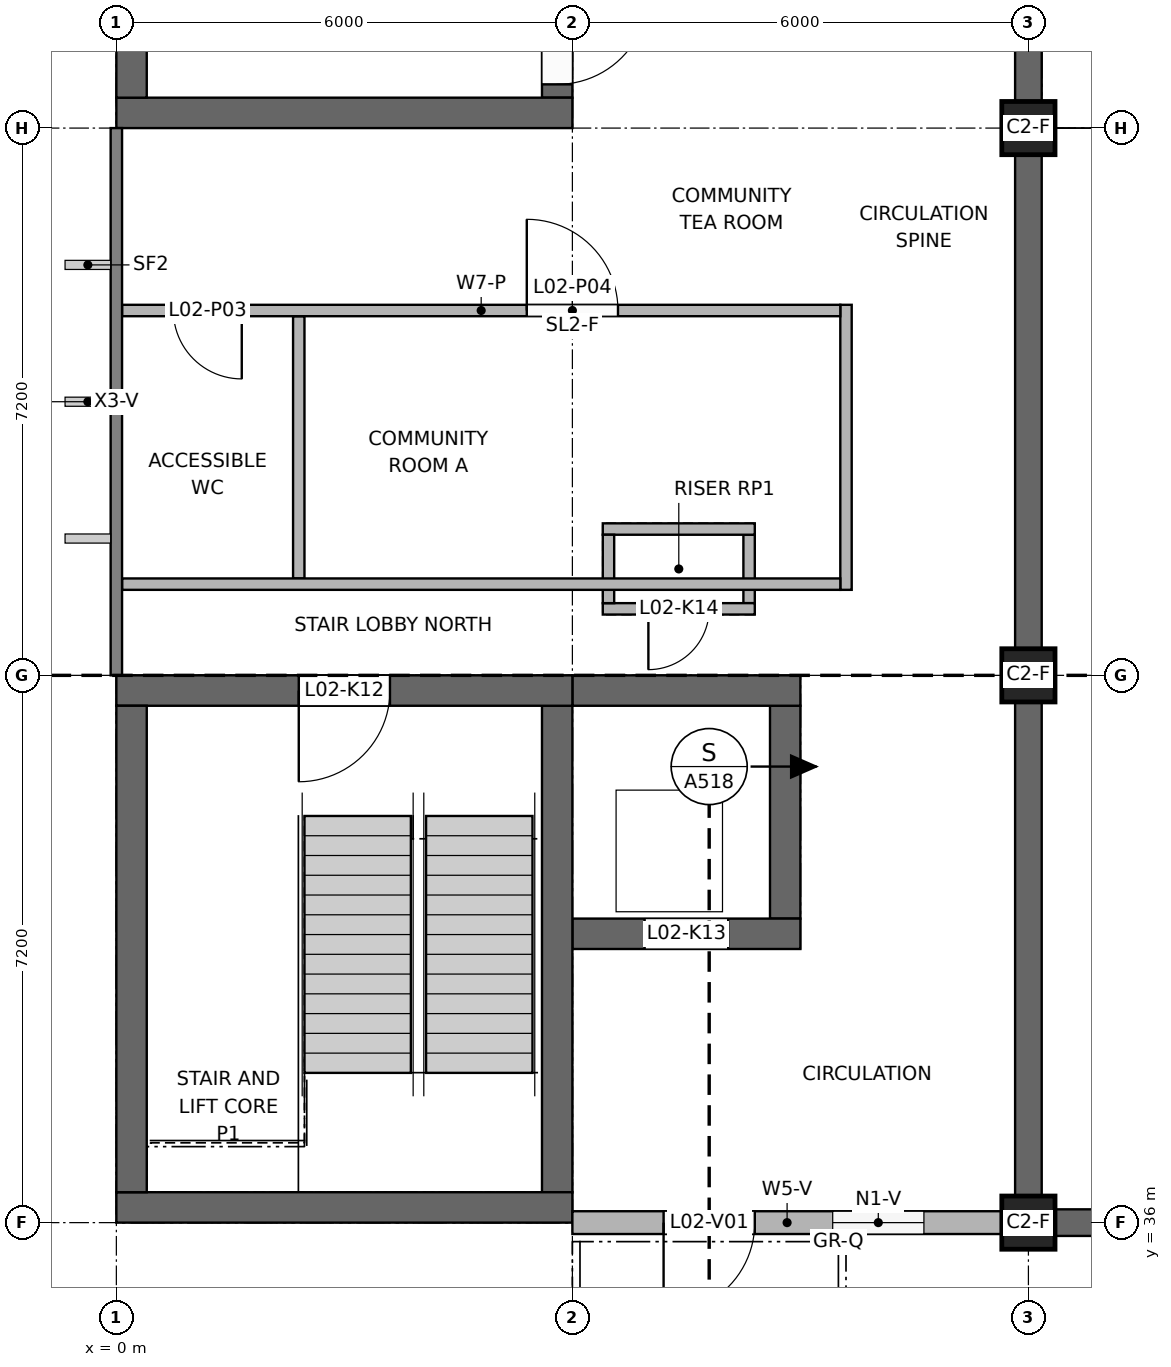
"""IFC4 building model, lengths in metres.
Left out: names, types, materials, properties, quantities, classifications, styles, units other than length and angle.
Written with IfcOpenShell. Run it as: python <this file> out.ifc"""

import sys

from ifc_helpers import new_model, si_unit, direction, frame, frame_2d, origin, origin_2d, place, context, subcontext, project, spatial, rectangle, extrude, element, fill, save


model = new_model("IFC4")
c1 = context("Model", 3, precision=1e-05, world=origin(), true_north=direction((0.0, 1.0)))
c2 = subcontext(c1, "Body", "Model", "MODEL_VIEW")
j1 = project(units=[si_unit("LENGTHUNIT", "METRE"), si_unit("PLANEANGLEUNIT", "RADIAN")], contexts=[c1])
p1 = place(None, origin())
s1 = spatial("IfcSite", under=j1, at=p1, CompositionType="ELEMENT")
p2 = place(p1, origin())
s2 = spatial("IfcBuilding", under=s1, at=p2, CompositionType="ELEMENT")
p3 = place(p2, frame((0.0, 0.0, 8.4)))
s3 = spatial("IfcBuildingStorey", under=s2, at=p3, CompositionType="ELEMENT", Elevation=8.4)
p4 = place(p3, frame((0.0, 36.2, 0.0), z_axis=(0.0, 0.0, 1.0), x_axis=(1.0, 0.0, 0.0)))
e1 = element("IfcWall", 1, at=p4, inside=s3, PredefinedType="SHEAR", context=c2, shape_type="SweptSolid", body=[
    extrude(rectangle(XDim=6.0, YDim=0.4, at=frame_2d((3.0, 0.0))), origin(), (0.0, 0.0, 1.0), 4.0),
])
p5 = place(p3, frame((0.0, 43.0, 0.0), z_axis=(0.0, 0.0, 1.0), x_axis=(1.0, 0.0, 0.0)))
e2 = element("IfcWall", 2, at=p5, inside=s3, PredefinedType="SHEAR", context=c2, shape_type="SweptSolid", body=[
    extrude(rectangle(XDim=6.0, YDim=0.4, at=frame_2d((3.0, 0.0))), origin(), (0.0, 0.0, 1.0), 4.0),
])
p6 = place(p5, frame((2.4, 0.0, 0.0)))
e3 = element("IfcOpeningElement", 3, at=p6, cuts=e2, PredefinedType="OPENING", context=c2, shape_type="SweptSolid", body=[
    extrude(rectangle(XDim=1.2, YDim=2.1, at=frame_2d((0.6, 1.05))), frame((0.0, 0.21, 0.0), z_axis=(0.0, -1.0, 0.0), x_axis=(1.0, 0.0, 0.0)), (0.0, 0.0, 1.0), 0.42),
])
for number, where, z_axis, x_axis in (
    (4, (0.2, 36.4, 0.0), (0.0, 0.0, 1.0), (0.0, 1.0, 0.0)),
    (5, (5.8, 36.4, 0.0), (0.0, 0.0, 1.0), (0.0, 1.0, 0.0)),
):
    element("IfcWall", number, at=place(p3, frame(where, z_axis=z_axis, x_axis=x_axis)), inside=s3, PredefinedType="SHEAR", context=c2, shape_type="SweptSolid", body=[
        extrude(rectangle(XDim=6.4, YDim=0.4, at=frame_2d((3.2, 0.0))), origin(), (0.0, 0.0, 1.0), 4.0),
    ])
p7 = place(p3, frame((6.0, 39.8, 0.0), z_axis=(0.0, 0.0, 1.0), x_axis=(1.0, 0.0, 0.0)))
e6 = element("IfcWall", 6, at=p7, inside=s3, PredefinedType="SHEAR", context=c2, shape_type="SweptSolid", body=[
    extrude(rectangle(XDim=3.0, YDim=0.4, at=frame_2d((1.5, 0.0))), origin(), (0.0, 0.0, 1.0), 4.2),
])
p8 = place(p7, frame((0.95, 0.0, 0.0)))
e7 = element("IfcOpeningElement", 7, at=p8, cuts=e6, PredefinedType="OPENING", context=c2, shape_type="SweptSolid", body=[
    extrude(rectangle(XDim=1.1, YDim=2.1, at=frame_2d((0.55, 1.05))), frame((0.0, 0.21, 0.0), z_axis=(0.0, -1.0, 0.0), x_axis=(1.0, 0.0, 0.0)), (0.0, 0.0, 1.0), 0.42),
])
p9 = place(p3, frame((6.0, 43.0, 0.0), z_axis=(0.0, 0.0, 1.0), x_axis=(1.0, 0.0, 0.0)))
e8 = element("IfcWall", 8, at=p9, inside=s3, PredefinedType="SHEAR", context=c2, shape_type="SweptSolid", body=[
    extrude(rectangle(XDim=3.0, YDim=0.4, at=frame_2d((1.5, 0.0))), origin(), (0.0, 0.0, 1.0), 4.2),
])
p10 = place(p3, frame((8.8, 40.0, 0.0), z_axis=(0.0, 0.0, 1.0), x_axis=(0.0, 1.0, 0.0)))
e9 = element("IfcWall", 9, at=p10, inside=s3, PredefinedType="SHEAR", context=c2, shape_type="SweptSolid", body=[
    extrude(rectangle(XDim=2.8, YDim=0.4, at=frame_2d((1.4, 0.0))), origin(), (0.0, 0.0, 1.0), 4.2),
])
p11 = place(p3, frame((0.0, 50.6, 0.0), z_axis=(0.0, 0.0, 1.0), x_axis=(1.0, 0.0, 0.0)))
e10 = element("IfcWall", 10, at=p11, inside=s3, PredefinedType="SHEAR", context=c2, shape_type="SweptSolid", body=[
    extrude(rectangle(XDim=6.0, YDim=0.4, at=frame_2d((3.0, 0.0))), origin(), (0.0, 0.0, 1.0), 4.0),
])
p12 = place(p3, frame((0.2, 50.8, 0.0), z_axis=(0.0, 0.0, 1.0), x_axis=(0.0, 1.0, 0.0)))
e11 = element("IfcWall", 11, at=p12, inside=s3, PredefinedType="SHEAR", context=c2, shape_type="SweptSolid", body=[
    extrude(rectangle(XDim=6.4, YDim=0.4, at=frame_2d((3.2, 0.0))), origin(), (0.0, 0.0, 1.0), 4.0),
])
p13 = place(p3, frame((5.8, 50.8, 0.0), z_axis=(0.0, 0.0, 1.0), x_axis=(0.0, 1.0, 0.0)))
e12 = element("IfcWall", 12, at=p13, inside=s3, PredefinedType="SHEAR", context=c2, shape_type="SweptSolid", body=[
    extrude(rectangle(XDim=6.4, YDim=0.4, at=frame_2d((3.2, 0.0))), origin(), (0.0, 0.0, 1.0), 4.0),
])
p14 = place(p13, frame((0.175, 0.0, 0.0)))
e13 = element("IfcOpeningElement", 13, at=p14, cuts=e12, PredefinedType="OPENING", context=c2, shape_type="SweptSolid", body=[
    extrude(rectangle(XDim=1.2, YDim=2.1, at=frame_2d((0.6, 1.05))), frame((0.0, 0.21, 0.0), z_axis=(0.0, -1.0, 0.0), x_axis=(1.0, 0.0, 0.0)), (0.0, 0.0, 1.0), 0.42),
])
p15 = place(p3, frame((6.4, 44.075, 0.0), z_axis=(0.0, 0.0, 1.0), x_axis=(1.0, 0.0, 0.0)))
e14 = element("IfcWall", 14, at=p15, inside=s3, PredefinedType="SOLIDWALL", context=c2, shape_type="SweptSolid", body=[
    extrude(rectangle(XDim=2.0, YDim=0.15, at=frame_2d((1.0, 0.0))), origin(), (0.0, 0.0, 1.0), 4.2),
])
p16 = place(p15, frame((0.6, 0.0, 0.0)))
e15 = element("IfcOpeningElement", 15, at=p16, cuts=e14, PredefinedType="OPENING", context=c2, shape_type="SweptSolid", body=[
    extrude(rectangle(XDim=0.8, YDim=2.1, at=frame_2d((0.4, 1.05))), frame((0.0, 0.085, 0.0), z_axis=(0.0, -1.0, 0.0), x_axis=(1.0, 0.0, 0.0)), (0.0, 0.0, 1.0), 0.17),
])
p17 = place(p3, frame((6.4, 45.125, 0.0), z_axis=(0.0, 0.0, 1.0), x_axis=(1.0, 0.0, 0.0)))
e16 = element("IfcWall", 16, at=p17, inside=s3, PredefinedType="SOLIDWALL", context=c2, shape_type="SweptSolid", body=[
    extrude(rectangle(XDim=2.0, YDim=0.15, at=frame_2d((1.0, 0.0))), origin(), (0.0, 0.0, 1.0), 4.2),
])
for number, where, z_axis, x_axis in (
    (17, (6.475, 44.15, 0.0), (0.0, 0.0, 1.0), (0.0, 1.0, 0.0)),
    (18, (8.325, 44.15, 0.0), (0.0, 0.0, 1.0), (0.0, 1.0, 0.0)),
):
    element("IfcWall", number, at=place(p3, frame(where, z_axis=z_axis, x_axis=x_axis)), inside=s3, PredefinedType="SOLIDWALL", context=c2, shape_type="SweptSolid", body=[
        extrude(rectangle(XDim=0.9, YDim=0.15, at=frame_2d((0.45, 0.0))), origin(), (0.0, 0.0, 1.0), 4.2),
    ])
for number, where, z_axis, x_axis in (
    (19, (12.0, 36.0, 0.0), (0.0, 0.0, 1.0), (1.0, 0.0, 0.0)),
    (20, (12.0, 43.2, 0.0), (0.0, 0.0, 1.0), (1.0, 0.0, 0.0)),
    (21, (12.0, 50.4, 0.0), (0.0, 0.0, 1.0), (1.0, 0.0, 0.0)),
):
    element("IfcColumn", number, at=place(p3, frame(where, z_axis=z_axis, x_axis=x_axis)), inside=s3, PredefinedType="COLUMN", context=c2, shape_type="SweptSolid", body=[
        extrude(rectangle(XDim=0.7, YDim=0.7, at=origin_2d()), origin(), (0.0, 0.0, 1.0), 4.0),
    ])
for number, where, z_axis, x_axis in (
    (22, (12.0, 36.35, 0.0), (0.0, 0.0, 1.0), (0.0, 1.0, 0.0)),
    (23, (12.0, 43.55, 0.0), (0.0, 0.0, 1.0), (0.0, 1.0, 0.0)),
):
    element("IfcWall", number, at=place(p3, frame(where, z_axis=z_axis, x_axis=x_axis)), inside=s3, PredefinedType="SHEAR", context=c2, shape_type="SweptSolid", body=[
        extrude(rectangle(XDim=6.5, YDim=0.35, at=frame_2d((3.25, 0.0))), origin(), (0.0, 0.0, 1.0), 3.1),
    ])
p18 = place(p3, frame((12.0, 50.75, 0.0), z_axis=(0.0, 0.0, 1.0), x_axis=(0.0, 1.0, 0.0)))
e24 = element("IfcWall", 24, at=p18, inside=s3, PredefinedType="SHEAR", context=c2, shape_type="SweptSolid", body=[
    extrude(rectangle(XDim=6.5, YDim=0.35, at=frame_2d((3.25, 0.0))), origin(), (0.0, 0.0, 1.0), 3.1),
])
p19 = place(p18, frame((5.15, 0.0, 0.0)))
e25 = element("IfcOpeningElement", 25, at=p19, cuts=e24, PredefinedType="OPENING", context=c2, shape_type="SweptSolid", body=[
    extrude(rectangle(XDim=1.2, YDim=2.1, at=frame_2d((0.6, 1.05))), frame((0.0, 0.185, 0.0), z_axis=(0.0, -1.0, 0.0), x_axis=(1.0, 0.0, 0.0)), (0.0, 0.0, 1.0), 0.37),
])
p20 = place(p3, frame((12.35, 36.0, 0.0), z_axis=(0.0, 0.0, 1.0), x_axis=(1.0, 0.0, 0.0)))
e26 = element("IfcWall", 26, at=p20, inside=s3, PredefinedType="SHEAR", context=c2, shape_type="SweptSolid", body=[
    extrude(rectangle(XDim=17.475, YDim=0.35, at=frame_2d((8.737, 0.0))), origin(), (0.0, 0.0, 1.0), 4.2),
])
p21 = place(p20, frame((0.85, 0.0, 1.2)))
e27 = element("IfcOpeningElement", 27, at=p21, cuts=e26, PredefinedType="OPENING", context=c2, shape_type="SweptSolid", body=[
    extrude(rectangle(XDim=0.6, YDim=2.4, at=frame_2d((0.3, 1.2))), frame((0.0, 0.185, 0.0), z_axis=(0.0, -1.0, 0.0), x_axis=(1.0, 0.0, 0.0)), (0.0, 0.0, 1.0), 0.37),
])
p22 = place(p20, frame((3.85, 0.0, 1.2)))
e28 = element("IfcOpeningElement", 28, at=p22, cuts=e26, PredefinedType="OPENING", context=c2, shape_type="SweptSolid", body=[
    extrude(rectangle(XDim=0.6, YDim=2.4, at=frame_2d((0.3, 1.2))), frame((0.0, 0.185, 0.0), z_axis=(0.0, -1.0, 0.0), x_axis=(1.0, 0.0, 0.0)), (0.0, 0.0, 1.0), 0.37),
])
p23 = place(p20, frame((6.85, 0.0, 1.2)))
e29 = element("IfcOpeningElement", 29, at=p23, cuts=e26, PredefinedType="OPENING", context=c2, shape_type="SweptSolid", body=[
    extrude(rectangle(XDim=0.6, YDim=2.4, at=frame_2d((0.3, 1.2))), frame((0.0, 0.185, 0.0), z_axis=(0.0, -1.0, 0.0), x_axis=(1.0, 0.0, 0.0)), (0.0, 0.0, 1.0), 0.37),
])
p24 = place(p20, frame((9.85, 0.0, 1.2)))
e30 = element("IfcOpeningElement", 30, at=p24, cuts=e26, PredefinedType="OPENING", context=c2, shape_type="SweptSolid", body=[
    extrude(rectangle(XDim=0.6, YDim=2.4, at=frame_2d((0.3, 1.2))), frame((0.0, 0.185, 0.0), z_axis=(0.0, -1.0, 0.0), x_axis=(1.0, 0.0, 0.0)), (0.0, 0.0, 1.0), 0.37),
])
p25 = place(p20, frame((12.85, 0.0, 1.2)))
e31 = element("IfcOpeningElement", 31, at=p25, cuts=e26, PredefinedType="OPENING", context=c2, shape_type="SweptSolid", body=[
    extrude(rectangle(XDim=0.6, YDim=2.4, at=frame_2d((0.3, 1.2))), frame((0.0, 0.185, 0.0), z_axis=(0.0, -1.0, 0.0), x_axis=(1.0, 0.0, 0.0)), (0.0, 0.0, 1.0), 0.37),
])
p26 = place(p20, frame((15.85, 0.0, 1.2)))
e32 = element("IfcOpeningElement", 32, at=p26, cuts=e26, PredefinedType="OPENING", context=c2, shape_type="SweptSolid", body=[
    extrude(rectangle(XDim=0.6, YDim=2.4, at=frame_2d((0.3, 1.2))), frame((0.0, 0.185, 0.0), z_axis=(0.0, -1.0, 0.0), x_axis=(1.0, 0.0, 0.0)), (0.0, 0.0, 1.0), 0.37),
])
p27 = place(p3, frame((6.0, 36.0, 0.0), z_axis=(0.0, 0.0, 1.0), x_axis=(1.0, 0.0, 0.0)))
e33 = element("IfcWall", 33, at=p27, inside=s3, PredefinedType="SOLIDWALL", context=c2, shape_type="SweptSolid", body=[
    extrude(rectangle(XDim=5.65, YDim=0.3, at=frame_2d((2.825, 0.0))), origin(), (0.0, 0.0, 1.0), 3.2),
])
p28 = place(p27, frame((1.2, 0.0, 0.0)))
e34 = element("IfcOpeningElement", 34, at=p28, cuts=e33, PredefinedType="OPENING", context=c2, shape_type="SweptSolid", body=[
    extrude(rectangle(XDim=1.2, YDim=2.4, at=frame_2d((0.6, 1.2))), frame((0.0, 0.16, 0.0), z_axis=(0.0, -1.0, 0.0), x_axis=(1.0, 0.0, 0.0)), (0.0, 0.0, 1.0), 0.32),
])
p29 = place(p27, frame((3.425, 0.0, 0.9)))
e35 = element("IfcOpeningElement", 35, at=p29, cuts=e33, PredefinedType="OPENING", context=c2, shape_type="SweptSolid", body=[
    extrude(rectangle(XDim=1.2, YDim=1.5, at=frame_2d((0.6, 0.75))), frame((0.0, 0.16, 0.0), z_axis=(0.0, -1.0, 0.0), x_axis=(1.0, 0.0, 0.0)), (0.0, 0.0, 1.0), 0.32),
])
p30 = place(p3, frame((2.4, 44.475, 0.0), z_axis=(0.0, 0.0, 1.0), x_axis=(0.0, 1.0, 0.0)))
e36 = element("IfcWall", 36, at=p30, inside=s3, PredefinedType="PARTITIONING", context=c2, shape_type="SweptSolid", body=[
    extrude(rectangle(XDim=3.45, YDim=0.15, at=frame_2d((1.725, 0.0))), origin(), (0.0, 0.0, 1.0), 4.0),
])
p31 = place(p3, frame((9.6, 44.325, 0.0), z_axis=(0.0, 0.0, 1.0), x_axis=(0.0, 1.0, 0.0)))
e37 = element("IfcWall", 37, at=p31, inside=s3, PredefinedType="PARTITIONING", context=c2, shape_type="SweptSolid", body=[
    extrude(rectangle(XDim=3.75, YDim=0.15, at=frame_2d((1.875, 0.0))), origin(), (0.0, 0.0, 1.0), 4.0),
])
p32 = place(p3, frame((0.075, 44.4, 0.0), z_axis=(0.0, 0.0, 1.0), x_axis=(1.0, 0.0, 0.0)))
e38 = element("IfcWall", 38, at=p32, inside=s3, PredefinedType="PARTITIONING", context=c2, shape_type="SweptSolid", body=[
    extrude(rectangle(XDim=9.45, YDim=0.15, at=frame_2d((4.725, 0.0))), origin(), (0.0, 0.0, 1.0), 4.0),
])
p33 = place(p3, frame((0.075, 48.0, 0.0), z_axis=(0.0, 0.0, 1.0), x_axis=(1.0, 0.0, 0.0)))
e39 = element("IfcWall", 39, at=p33, inside=s3, PredefinedType="PARTITIONING", context=c2, shape_type="SweptSolid", body=[
    extrude(rectangle(XDim=9.45, YDim=0.15, at=frame_2d((4.725, 0.0))), origin(), (0.0, 0.0, 1.0), 4.0),
])
p34 = place(p33, frame((0.675, 0.0, 0.0)))
e40 = element("IfcOpeningElement", 40, at=p34, cuts=e39, PredefinedType="OPENING", context=c2, shape_type="SweptSolid", body=[
    extrude(rectangle(XDim=0.9, YDim=2.1, at=frame_2d((0.45, 1.05))), frame((0.0, 0.085, 0.0), z_axis=(0.0, -1.0, 0.0), x_axis=(1.0, 0.0, 0.0)), (0.0, 0.0, 1.0), 0.17),
])
p35 = place(p33, frame((5.325, 0.0, 0.0)))
e41 = element("IfcOpeningElement", 41, at=p35, cuts=e39, PredefinedType="OPENING", context=c2, shape_type="SweptSolid", body=[
    extrude(rectangle(XDim=1.2, YDim=2.1, at=frame_2d((0.6, 1.05))), frame((0.0, 0.085, 0.0), z_axis=(0.0, -1.0, 0.0), x_axis=(1.0, 0.0, 0.0)), (0.0, 0.0, 1.0), 0.17),
])
p36 = place(p28, frame((1.2, 0.0, 0.0), z_axis=(0.0, 0.0, 1.0), x_axis=(-1.0, 0.0, 0.0)))
e42 = element("IfcDoor", 42, at=p36, inside=s3, OperationType="SINGLE_SWING_RIGHT", PredefinedType="DOOR", context=c2, shape_type="SweptSolid", body=[
    extrude(rectangle(XDim=1.2, YDim=2.4, at=frame_2d((0.6, 1.2))), frame((0.0, 0.025, 0.0), z_axis=(0.0, -1.0, 0.0), x_axis=(1.0, 0.0, 0.0)), (0.0, 0.0, 1.0), 0.05),
])
fill(e34, e42)
p37 = place(p29, origin())
e43 = element("IfcWindow", 43, at=p37, inside=s3, PartitioningType="SINGLE_PANEL", PredefinedType="WINDOW", context=c2, shape_type="SweptSolid", body=[
    extrude(rectangle(XDim=1.2, YDim=1.5, at=frame_2d((0.6, 0.75))), frame((0.0, 0.03, 0.0), z_axis=(0.0, -1.0, 0.0), x_axis=(1.0, 0.0, 0.0)), (0.0, 0.0, 1.0), 0.06),
])
fill(e35, e43)
p38 = place(p6, frame((1.2, 0.0, 0.0), z_axis=(0.0, 0.0, 1.0), x_axis=(-1.0, 0.0, 0.0)))
e44 = element("IfcDoor", 44, at=p38, inside=s3, OperationType="SINGLE_SWING_RIGHT", PredefinedType="DOOR", context=c2, shape_type="SweptSolid", body=[
    extrude(rectangle(XDim=1.2, YDim=2.1, at=frame_2d((0.6, 1.05))), frame((0.0, 0.025, 0.0), z_axis=(0.0, -1.0, 0.0), x_axis=(1.0, 0.0, 0.0)), (0.0, 0.0, 1.0), 0.05),
])
fill(e3, e44)
p39 = place(p8, origin())
e45 = element("IfcDoor", 45, at=p39, inside=s3, OperationType="DOUBLE_DOOR_SLIDING", PredefinedType="DOOR", context=c2, shape_type="SweptSolid", body=[
    extrude(rectangle(XDim=1.1, YDim=2.1, at=frame_2d((0.55, 1.05))), frame((0.0, 0.025, 0.0), z_axis=(0.0, -1.0, 0.0), x_axis=(1.0, 0.0, 0.0)), (0.0, 0.0, 1.0), 0.05),
])
fill(e7, e45)
p40 = place(p16, frame((0.8, 0.0, 0.0), z_axis=(0.0, 0.0, 1.0), x_axis=(-1.0, 0.0, 0.0)))
e46 = element("IfcDoor", 46, at=p40, inside=s3, OperationType="SINGLE_SWING_RIGHT", PredefinedType="DOOR", context=c2, shape_type="SweptSolid", body=[
    extrude(rectangle(XDim=0.8, YDim=2.1, at=frame_2d((0.4, 1.05))), frame((0.0, 0.025, 0.0), z_axis=(0.0, -1.0, 0.0), x_axis=(1.0, 0.0, 0.0)), (0.0, 0.0, 1.0), 0.05),
])
fill(e15, e46)
p41 = place(p14, frame((1.2, 0.0, 0.0), z_axis=(0.0, 0.0, 1.0), x_axis=(-1.0, 0.0, 0.0)))
e47 = element("IfcDoor", 47, at=p41, inside=s3, OperationType="SINGLE_SWING_LEFT", PredefinedType="DOOR", context=c2, shape_type="SweptSolid", body=[
    extrude(rectangle(XDim=1.2, YDim=2.1, at=frame_2d((0.6, 1.05))), frame((0.0, 0.025, 0.0), z_axis=(0.0, -1.0, 0.0), x_axis=(1.0, 0.0, 0.0)), (0.0, 0.0, 1.0), 0.05),
])
fill(e13, e47)
p42 = place(p34, frame((0.9, 0.0, 0.0), z_axis=(0.0, 0.0, 1.0), x_axis=(-1.0, 0.0, 0.0)))
e48 = element("IfcDoor", 48, at=p42, inside=s3, OperationType="SINGLE_SWING_LEFT", PredefinedType="DOOR", context=c2, shape_type="SweptSolid", body=[
    extrude(rectangle(XDim=0.9, YDim=2.1, at=frame_2d((0.45, 1.05))), frame((0.0, 0.025, 0.0), z_axis=(0.0, -1.0, 0.0), x_axis=(1.0, 0.0, 0.0)), (0.0, 0.0, 1.0), 0.05),
])
fill(e40, e48)
p43 = place(p35, origin())
e49 = element("IfcDoor", 49, at=p43, inside=s3, OperationType="SINGLE_SWING_LEFT", PredefinedType="DOOR", context=c2, shape_type="SweptSolid", body=[
    extrude(rectangle(XDim=1.2, YDim=2.1, at=frame_2d((0.6, 1.05))), frame((0.0, 0.025, 0.0), z_axis=(0.0, -1.0, 0.0), x_axis=(1.0, 0.0, 0.0)), (0.0, 0.0, 1.0), 0.05),
])
fill(e41, e49)
save(model, sys.argv[1])
